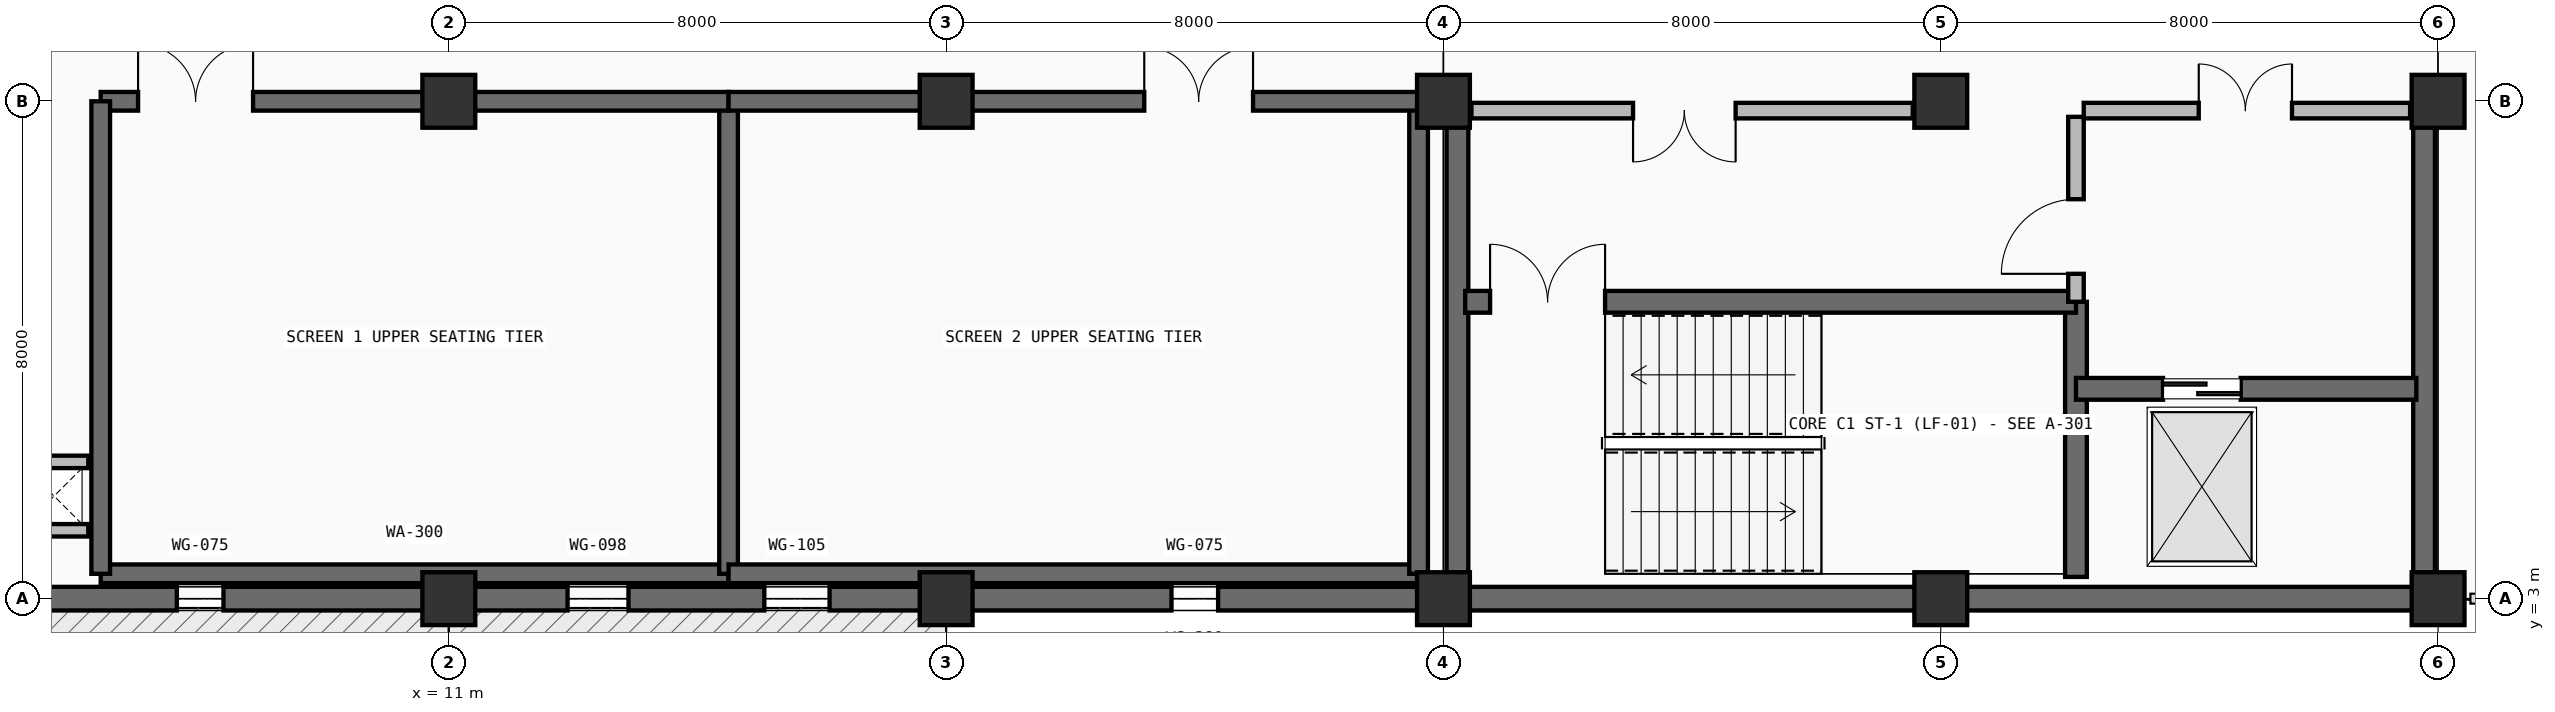
"""IFC4 building model, lengths in metres.
Left out: names, types, materials, properties, quantities, classifications, styles, units other than length and angle.
Written with IfcOpenShell. Run it as: python <this file> out.ifc"""

import sys

from ifc_helpers import new_model, si_unit, direction, frame, frame_2d, origin, origin_2d, place, context, subcontext, project, spatial, rectangle, extrude, element, fill, save


model = new_model("IFC4")
c1 = context("Model", 3, precision=1e-05, world=origin(), true_north=direction((0.0, 1.0)))
c2 = subcontext(c1, "Body", "Model", "MODEL_VIEW")
j1 = project(units=[si_unit("LENGTHUNIT", "METRE"), si_unit("PLANEANGLEUNIT", "RADIAN")], contexts=[c1])
p1 = place(None, origin())
s1 = spatial("IfcSite", under=j1, at=p1, CompositionType="ELEMENT")
p2 = place(p1, origin())
s2 = spatial("IfcBuilding", under=s1, at=p2, CompositionType="ELEMENT")
p3 = place(p2, frame((0.0, 0.0, 5.4)))
s3 = spatial("IfcBuildingStorey", under=s2, at=p3, CompositionType="ELEMENT", Elevation=5.4)
for number, where, z_axis, x_axis in (
    (1, (11.0, 3.0, 0.0), (0.0, 0.0, 1.0), (1.0, 0.0, 0.0)),
    (2, (11.0, 11.0, 0.0), (0.0, 0.0, 1.0), (1.0, 0.0, 0.0)),
    (3, (19.0, 3.0, 0.0), (0.0, 0.0, 1.0), (1.0, 0.0, 0.0)),
    (4, (19.0, 11.0, 0.0), (0.0, 0.0, 1.0), (1.0, 0.0, 0.0)),
    (5, (27.0, 3.0, 0.0), (0.0, 0.0, 1.0), (1.0, 0.0, 0.0)),
    (6, (27.0, 11.0, 0.0), (0.0, 0.0, 1.0), (1.0, 0.0, 0.0)),
    (7, (35.0, 3.0, 0.0), (0.0, 0.0, 1.0), (1.0, 0.0, 0.0)),
    (8, (35.0, 11.0, 0.0), (0.0, 0.0, 1.0), (1.0, 0.0, 0.0)),
    (9, (43.0, 3.0, 0.0), (0.0, 0.0, 1.0), (1.0, 0.0, 0.0)),
    (10, (43.0, 11.0, 0.0), (0.0, 0.0, 1.0), (1.0, 0.0, 0.0)),
):
    element("IfcColumn", number, at=place(p3, frame(where, z_axis=z_axis, x_axis=x_axis)), inside=s3, PredefinedType="COLUMN", context=c2, shape_type="SweptSolid", body=[
        extrude(rectangle(XDim=0.85, YDim=0.85, at=origin_2d()), origin(), (0.0, 0.0, 1.0), 4.5),
    ])
for number, where, z_axis, x_axis in (
    (11, (43.0, 3.0, 0.0), (0.0, 0.0, 1.0), (-1.0, 0.0, 0.0)),
    (12, (35.0, 3.0, 0.0), (0.0, 0.0, 1.0), (-1.0, 0.0, 0.0)),
):
    element("IfcWall", number, at=place(p3, frame(where, z_axis=z_axis, x_axis=x_axis)), inside=s3, PredefinedType="SOLIDWALL", context=c2, shape_type="SweptSolid", body=[
        extrude(rectangle(XDim=8.0, YDim=0.38, at=frame_2d((4.0, 0.0))), origin(), (0.0, 0.0, 1.0), 4.5),
    ])
p4 = place(p3, frame((27.0, 3.0, 0.0), z_axis=(0.0, 0.0, 1.0), x_axis=(-1.0, 0.0, 0.0)))
e13 = element("IfcWall", 13, at=p4, inside=s3, PredefinedType="SOLIDWALL", context=c2, shape_type="SweptSolid", body=[
    extrude(rectangle(XDim=8.0, YDim=0.38, at=frame_2d((4.0, 0.0))), origin(), (0.0, 0.0, 1.0), 4.5),
])
p5 = place(p4, frame((3.625, 0.0, 1.05)))
e14 = element("IfcOpeningElement", 14, at=p5, cuts=e13, PredefinedType="OPENING", context=c2, shape_type="SweptSolid", body=[
    extrude(rectangle(XDim=0.75, YDim=1.3, at=frame_2d((0.375, 0.65))), frame((0.0, 0.2, 0.0), z_axis=(0.0, -1.0, 0.0), x_axis=(1.0, 0.0, 0.0)), (0.0, 0.0, 1.0), 0.4),
])
p6 = place(p3, frame((19.0, 3.0, 0.0), z_axis=(0.0, 0.0, 1.0), x_axis=(-1.0, 0.0, 0.0)))
e15 = element("IfcWall", 15, at=p6, inside=s3, PredefinedType="SOLIDWALL", context=c2, shape_type="SweptSolid", body=[
    extrude(rectangle(XDim=8.0, YDim=0.38, at=frame_2d((4.0, 0.0))), origin(), (0.0, 0.0, 1.0), 4.5),
])
p7 = place(p6, frame((1.875, 0.0, 1.05)))
e16 = element("IfcOpeningElement", 16, at=p7, cuts=e15, PredefinedType="OPENING", context=c2, shape_type="SweptSolid", body=[
    extrude(rectangle(XDim=1.05, YDim=1.7, at=frame_2d((0.525, 0.85))), frame((0.0, 0.2, 0.0), z_axis=(0.0, -1.0, 0.0), x_axis=(1.0, 0.0, 0.0)), (0.0, 0.0, 1.0), 0.4),
])
p8 = place(p6, frame((5.11, 0.0, 1.05)))
e17 = element("IfcOpeningElement", 17, at=p8, cuts=e15, PredefinedType="OPENING", context=c2, shape_type="SweptSolid", body=[
    extrude(rectangle(XDim=0.98, YDim=1.6, at=frame_2d((0.49, 0.8))), frame((0.0, 0.2, 0.0), z_axis=(0.0, -1.0, 0.0), x_axis=(1.0, 0.0, 0.0)), (0.0, 0.0, 1.0), 0.4),
])
p9 = place(p3, frame((11.0, 3.0, 0.0), z_axis=(0.0, 0.0, 1.0), x_axis=(-1.0, 0.0, 0.0)))
e18 = element("IfcWall", 18, at=p9, inside=s3, PredefinedType="SOLIDWALL", context=c2, shape_type="SweptSolid", body=[
    extrude(rectangle(XDim=8.0, YDim=0.38, at=frame_2d((4.0, 0.0))), origin(), (0.0, 0.0, 1.0), 4.5),
])
p10 = place(p9, frame((3.625, 0.0, 1.05)))
e19 = element("IfcOpeningElement", 19, at=p10, cuts=e18, PredefinedType="OPENING", context=c2, shape_type="SweptSolid", body=[
    extrude(rectangle(XDim=0.75, YDim=1.3, at=frame_2d((0.375, 0.65))), frame((0.0, 0.2, 0.0), z_axis=(0.0, -1.0, 0.0), x_axis=(1.0, 0.0, 0.0)), (0.0, 0.0, 1.0), 0.4),
])
p11 = place(p3, frame((27.225, 3.2, 0.0), z_axis=(0.0, 0.0, 1.0), x_axis=(0.0, 1.0, 0.0)))
e20 = element("IfcWall", 20, at=p11, inside=s3, PredefinedType="SHEAR", context=c2, shape_type="SweptSolid", body=[
    extrude(rectangle(XDim=7.6, YDim=0.35, at=frame_2d((3.8, 0.0))), origin(), (0.0, 0.0, 1.0), 4.2),
])
p12 = place(p3, frame((37.175, 3.35, 0.0), z_axis=(0.0, 0.0, 1.0), x_axis=(0.0, 1.0, 0.0)))
e21 = element("IfcWall", 21, at=p12, inside=s3, PredefinedType="SHEAR", context=c2, shape_type="SweptSolid", body=[
    extrude(rectangle(XDim=4.425, YDim=0.35, at=frame_2d((2.212, 0.0))), origin(), (0.0, 0.0, 1.0), 4.2),
])
p13 = place(p3, frame((42.775, 3.2, 0.0), z_axis=(0.0, 0.0, 1.0), x_axis=(0.0, 1.0, 0.0)))
e22 = element("IfcWall", 22, at=p13, inside=s3, PredefinedType="SHEAR", context=c2, shape_type="SweptSolid", body=[
    extrude(rectangle(XDim=7.6, YDim=0.35, at=frame_2d((3.8, 0.0))), origin(), (0.0, 0.0, 1.0), 4.2),
])
p14 = place(p3, frame((27.35, 7.775, 0.0), z_axis=(0.0, 0.0, 1.0), x_axis=(1.0, 0.0, 0.0)))
e23 = element("IfcWall", 23, at=p14, inside=s3, PredefinedType="SHEAR", context=c2, shape_type="SweptSolid", body=[
    extrude(rectangle(XDim=9.825, YDim=0.35, at=frame_2d((4.913, 0.0))), origin(), (0.0, 0.0, 1.0), 4.2),
])
p15 = place(p14, frame((0.4, 0.0, 0.0)))
e24 = element("IfcOpeningElement", 24, at=p15, cuts=e23, PredefinedType="OPENING", context=c2, shape_type="SweptSolid", body=[
    extrude(rectangle(XDim=1.85, YDim=2.25, at=frame_2d((0.925, 1.125))), frame((0.0, 0.185, 0.0), z_axis=(0.0, -1.0, 0.0), x_axis=(1.0, 0.0, 0.0)), (0.0, 0.0, 1.0), 0.37),
])
p16 = place(p3, frame((37.175, 6.375, 0.0), z_axis=(0.0, 0.0, 1.0), x_axis=(1.0, 0.0, 0.0)))
e25 = element("IfcWall", 25, at=p16, inside=s3, PredefinedType="SHEAR", context=c2, shape_type="SweptSolid", body=[
    extrude(rectangle(XDim=5.475, YDim=0.35, at=frame_2d((2.737, 0.0))), origin(), (0.0, 0.0, 1.0), 4.2),
])
p17 = place(p16, frame((1.4, 0.0, 0.0)))
e26 = element("IfcOpeningElement", 26, at=p17, cuts=e25, PredefinedType="OPENING", context=c2, shape_type="SweptSolid", body=[
    extrude(rectangle(XDim=1.25, YDim=2.25, at=frame_2d((0.625, 1.125))), frame((0.0, 0.185, 0.0), z_axis=(0.0, -1.0, 0.0), x_axis=(1.0, 0.0, 0.0)), (0.0, 0.0, 1.0), 0.37),
])
p18 = place(p3, frame((37.175, 7.775, 0.0), z_axis=(0.0, 0.0, 1.0), x_axis=(0.0, 1.0, 0.0)))
e27 = element("IfcWall", 27, at=p18, inside=s3, PredefinedType="PARTITIONING", context=c2, shape_type="SweptSolid", body=[
    extrude(rectangle(XDim=2.975, YDim=0.25, at=frame_2d((1.488, 0.0))), origin(), (0.0, 0.0, 1.0), 4.2),
])
p19 = place(p18, frame((0.45, 0.0, 0.0)))
e28 = element("IfcOpeningElement", 28, at=p19, cuts=e27, PredefinedType="OPENING", context=c2, shape_type="SweptSolid", body=[
    extrude(rectangle(XDim=1.2, YDim=2.2, at=frame_2d((0.6, 1.1))), frame((0.0, 0.135, 0.0), z_axis=(0.0, -1.0, 0.0), x_axis=(1.0, 0.0, 0.0)), (0.0, 0.0, 1.0), 0.27),
])
p20 = place(p3, frame((27.45, 10.85, 0.0), z_axis=(0.0, 0.0, 1.0), x_axis=(1.0, 0.0, 0.0)))
e29 = element("IfcWall", 29, at=p20, inside=s3, PredefinedType="PARTITIONING", context=c2, shape_type="SweptSolid", body=[
    extrude(rectangle(XDim=7.1, YDim=0.25, at=frame_2d((3.55, 0.0))), origin(), (0.0, 0.0, 1.0), 3.435),
])
p21 = place(p20, frame((2.6, 0.0, 0.0)))
e30 = element("IfcOpeningElement", 30, at=p21, cuts=e29, PredefinedType="OPENING", context=c2, shape_type="SweptSolid", body=[
    extrude(rectangle(XDim=1.65, YDim=2.25, at=frame_2d((0.825, 1.125))), frame((0.0, 0.135, 0.0), z_axis=(0.0, -1.0, 0.0), x_axis=(1.0, 0.0, 0.0)), (0.0, 0.0, 1.0), 0.27),
])
p22 = place(p3, frame((37.3, 10.85, 0.0), z_axis=(0.0, 0.0, 1.0), x_axis=(1.0, 0.0, 0.0)))
e31 = element("IfcWall", 31, at=p22, inside=s3, PredefinedType="PARTITIONING", context=c2, shape_type="SweptSolid", body=[
    extrude(rectangle(XDim=5.25, YDim=0.25, at=frame_2d((2.625, 0.0))), origin(), (0.0, 0.0, 1.0), 3.435),
])
p23 = place(p22, frame((1.85, 0.0, 0.0)))
e32 = element("IfcOpeningElement", 32, at=p23, cuts=e31, PredefinedType="OPENING", context=c2, shape_type="SweptSolid", body=[
    extrude(rectangle(XDim=1.5, YDim=2.2, at=frame_2d((0.75, 1.1))), frame((0.0, 0.135, 0.0), z_axis=(0.0, -1.0, 0.0), x_axis=(1.0, 0.0, 0.0)), (0.0, 0.0, 1.0), 0.27),
])
p24 = place(p3, frame((5.4, 3.4, 0.0), z_axis=(0.0, 0.0, 1.0), x_axis=(1.0, 0.0, 0.0)))
e33 = element("IfcWall", 33, at=p24, inside=s3, PredefinedType="SHEAR", context=c2, shape_type="SweptSolid", body=[
    extrude(rectangle(XDim=10.1, YDim=0.3, at=frame_2d((5.05, 0.0))), origin(), (0.0, 0.0, 1.0), 4.2),
])
p25 = place(p3, frame((15.5, 3.4, 0.0), z_axis=(0.0, 0.0, 1.0), x_axis=(0.0, 1.0, 0.0)))
e34 = element("IfcWall", 34, at=p25, inside=s3, PredefinedType="SHEAR", context=c2, shape_type="SweptSolid", body=[
    extrude(rectangle(XDim=7.6, YDim=0.3, at=frame_2d((3.8, 0.0))), origin(), (0.0, 0.0, 1.0), 4.2),
])
p26 = place(p3, frame((5.4, 11.0, 0.0), z_axis=(0.0, 0.0, 1.0), x_axis=(1.0, 0.0, 0.0)))
e35 = element("IfcWall", 35, at=p26, inside=s3, PredefinedType="SHEAR", context=c2, shape_type="SweptSolid", body=[
    extrude(rectangle(XDim=10.1, YDim=0.3, at=frame_2d((5.05, 0.0))), origin(), (0.0, 0.0, 1.0), 4.2),
])
p27 = place(p26, frame((0.601, 0.0, 0.0)))
e36 = element("IfcOpeningElement", 36, at=p27, cuts=e35, PredefinedType="OPENING", context=c2, shape_type="SweptSolid", body=[
    extrude(rectangle(XDim=1.85, YDim=2.25, at=frame_2d((0.925, 1.125))), frame((0.0, 0.16, 0.0), z_axis=(0.0, -1.0, 0.0), x_axis=(1.0, 0.0, 0.0)), (0.0, 0.0, 1.0), 0.32),
])
p28 = place(p3, frame((5.4, 3.4, 0.0), z_axis=(0.0, 0.0, 1.0), x_axis=(0.0, 1.0, 0.0)))
e37 = element("IfcWall", 37, at=p28, inside=s3, PredefinedType="SHEAR", context=c2, shape_type="SweptSolid", body=[
    extrude(rectangle(XDim=7.6, YDim=0.3, at=frame_2d((3.8, 0.0))), origin(), (0.0, 0.0, 1.0), 4.2),
])
p29 = place(p3, frame((15.5, 3.4, 0.0), z_axis=(0.0, 0.0, 1.0), x_axis=(1.0, 0.0, 0.0)))
e38 = element("IfcWall", 38, at=p29, inside=s3, PredefinedType="SHEAR", context=c2, shape_type="SweptSolid", body=[
    extrude(rectangle(XDim=11.1, YDim=0.3, at=frame_2d((5.55, 0.0))), origin(), (0.0, 0.0, 1.0), 4.2),
])
p30 = place(p3, frame((26.6, 3.4, 0.0), z_axis=(0.0, 0.0, 1.0), x_axis=(0.0, 1.0, 0.0)))
e39 = element("IfcWall", 39, at=p30, inside=s3, PredefinedType="SHEAR", context=c2, shape_type="SweptSolid", body=[
    extrude(rectangle(XDim=7.6, YDim=0.3, at=frame_2d((3.8, 0.0))), origin(), (0.0, 0.0, 1.0), 4.2),
])
p31 = place(p3, frame((15.5, 11.0, 0.0), z_axis=(0.0, 0.0, 1.0), x_axis=(1.0, 0.0, 0.0)))
e40 = element("IfcWall", 40, at=p31, inside=s3, PredefinedType="SHEAR", context=c2, shape_type="SweptSolid", body=[
    extrude(rectangle(XDim=11.1, YDim=0.3, at=frame_2d((5.55, 0.0))), origin(), (0.0, 0.0, 1.0), 4.2),
])
p32 = place(p31, frame((6.687, 0.0, 0.0)))
e41 = element("IfcOpeningElement", 41, at=p32, cuts=e40, PredefinedType="OPENING", context=c2, shape_type="SweptSolid", body=[
    extrude(rectangle(XDim=1.75, YDim=2.28, at=frame_2d((0.875, 1.14))), frame((0.0, 0.16, 0.0), z_axis=(0.0, -1.0, 0.0), x_axis=(1.0, 0.0, 0.0)), (0.0, 0.0, 1.0), 0.32),
])
for number, where, z_axis, x_axis in (
    (42, (4.1, 4.1, 0.0), (0.0, 0.0, 1.0), (1.0, 0.0, 0.0)),
    (43, (4.1, 5.2, 0.0), (0.0, 0.0, 1.0), (1.0, 0.0, 0.0)),
):
    element("IfcWall", number, at=place(p3, frame(where, z_axis=z_axis, x_axis=x_axis)), inside=s3, PredefinedType="PARTITIONING", context=c2, shape_type="SweptSolid", body=[
        extrude(rectangle(XDim=1.1, YDim=0.2, at=frame_2d((0.55, 0.0))), origin(), (0.0, 0.0, 1.0), 4.2),
    ])
p33 = place(p5, origin())
e44 = element("IfcWindow", 44, at=p33, inside=s3, PartitioningType="SINGLE_PANEL", PredefinedType="WINDOW", context=c2, shape_type="SweptSolid", body=[
    extrude(rectangle(XDim=0.75, YDim=1.3, at=frame_2d((0.375, 0.65))), frame((0.0, 0.03, 0.0), z_axis=(0.0, -1.0, 0.0), x_axis=(1.0, 0.0, 0.0)), (0.0, 0.0, 1.0), 0.06),
])
fill(e14, e44)
p34 = place(p7, origin())
e45 = element("IfcWindow", 45, at=p34, inside=s3, PartitioningType="SINGLE_PANEL", PredefinedType="WINDOW", context=c2, shape_type="SweptSolid", body=[
    extrude(rectangle(XDim=1.05, YDim=1.7, at=frame_2d((0.525, 0.85))), frame((0.0, 0.03, 0.0), z_axis=(0.0, -1.0, 0.0), x_axis=(1.0, 0.0, 0.0)), (0.0, 0.0, 1.0), 0.06),
])
fill(e16, e45)
p35 = place(p8, origin())
e46 = element("IfcWindow", 46, at=p35, inside=s3, PartitioningType="SINGLE_PANEL", PredefinedType="WINDOW", context=c2, shape_type="SweptSolid", body=[
    extrude(rectangle(XDim=0.98, YDim=1.6, at=frame_2d((0.49, 0.8))), frame((0.0, 0.03, 0.0), z_axis=(0.0, -1.0, 0.0), x_axis=(1.0, 0.0, 0.0)), (0.0, 0.0, 1.0), 0.06),
])
fill(e17, e46)
p36 = place(p10, origin())
e47 = element("IfcWindow", 47, at=p36, inside=s3, PartitioningType="SINGLE_PANEL", PredefinedType="WINDOW", context=c2, shape_type="SweptSolid", body=[
    extrude(rectangle(XDim=0.75, YDim=1.3, at=frame_2d((0.375, 0.65))), frame((0.0, 0.03, 0.0), z_axis=(0.0, -1.0, 0.0), x_axis=(1.0, 0.0, 0.0)), (0.0, 0.0, 1.0), 0.06),
])
fill(e19, e47)
p37 = place(p15, origin())
e48 = element("IfcDoor", 48, at=p37, inside=s3, OperationType="DOUBLE_DOOR_SINGLE_SWING", PredefinedType="DOOR", context=c2, shape_type="SweptSolid", body=[
    extrude(rectangle(XDim=1.85, YDim=2.25, at=frame_2d((0.925, 1.125))), frame((0.0, 0.025, 0.0), z_axis=(0.0, -1.0, 0.0), x_axis=(1.0, 0.0, 0.0)), (0.0, 0.0, 1.0), 0.05),
])
fill(e24, e48)
p38 = place(p17, origin())
e49 = element("IfcDoor", 49, at=p38, inside=s3, OperationType="DOUBLE_DOOR_SLIDING", PredefinedType="DOOR", context=c2, shape_type="SweptSolid", body=[
    extrude(rectangle(XDim=1.25, YDim=2.25, at=frame_2d((0.625, 1.125))), frame((0.0, 0.025, 0.0), z_axis=(0.0, -1.0, 0.0), x_axis=(1.0, 0.0, 0.0)), (0.0, 0.0, 1.0), 0.05),
])
fill(e26, e49)
p39 = place(p19, origin())
e50 = element("IfcDoor", 50, at=p39, inside=s3, OperationType="SINGLE_SWING_LEFT", PredefinedType="DOOR", context=c2, shape_type="SweptSolid", body=[
    extrude(rectangle(XDim=1.2, YDim=2.2, at=frame_2d((0.6, 1.1))), frame((0.0, 0.025, 0.0), z_axis=(0.0, -1.0, 0.0), x_axis=(1.0, 0.0, 0.0)), (0.0, 0.0, 1.0), 0.05),
])
fill(e28, e50)
p40 = place(p21, frame((1.65, 0.0, 0.0), z_axis=(0.0, 0.0, 1.0), x_axis=(-1.0, 0.0, 0.0)))
e51 = element("IfcDoor", 51, at=p40, inside=s3, OperationType="DOUBLE_DOOR_SINGLE_SWING", PredefinedType="DOOR", context=c2, shape_type="SweptSolid", body=[
    extrude(rectangle(XDim=1.65, YDim=2.25, at=frame_2d((0.825, 1.125))), frame((0.0, 0.025, 0.0), z_axis=(0.0, -1.0, 0.0), x_axis=(1.0, 0.0, 0.0)), (0.0, 0.0, 1.0), 0.05),
])
fill(e30, e51)
p41 = place(p23, origin())
e52 = element("IfcDoor", 52, at=p41, inside=s3, OperationType="DOUBLE_DOOR_SINGLE_SWING", PredefinedType="DOOR", context=c2, shape_type="SweptSolid", body=[
    extrude(rectangle(XDim=1.5, YDim=2.2, at=frame_2d((0.75, 1.1))), frame((0.0, 0.025, 0.0), z_axis=(0.0, -1.0, 0.0), x_axis=(1.0, 0.0, 0.0)), (0.0, 0.0, 1.0), 0.05),
])
fill(e32, e52)
p42 = place(p27, origin())
e53 = element("IfcDoor", 53, at=p42, inside=s3, OperationType="DOUBLE_DOOR_SINGLE_SWING", PredefinedType="DOOR", context=c2, shape_type="SweptSolid", body=[
    extrude(rectangle(XDim=1.85, YDim=2.25, at=frame_2d((0.925, 1.125))), frame((0.0, 0.025, 0.0), z_axis=(0.0, -1.0, 0.0), x_axis=(1.0, 0.0, 0.0)), (0.0, 0.0, 1.0), 0.05),
])
fill(e36, e53)
p43 = place(p32, origin())
e54 = element("IfcDoor", 54, at=p43, inside=s3, OperationType="DOUBLE_DOOR_SINGLE_SWING", PredefinedType="DOOR", context=c2, shape_type="SweptSolid", body=[
    extrude(rectangle(XDim=1.75, YDim=2.28, at=frame_2d((0.875, 1.14))), frame((0.0, 0.025, 0.0), z_axis=(0.0, -1.0, 0.0), x_axis=(1.0, 0.0, 0.0)), (0.0, 0.0, 1.0), 0.05),
])
fill(e41, e54)
save(model, sys.argv[1])
